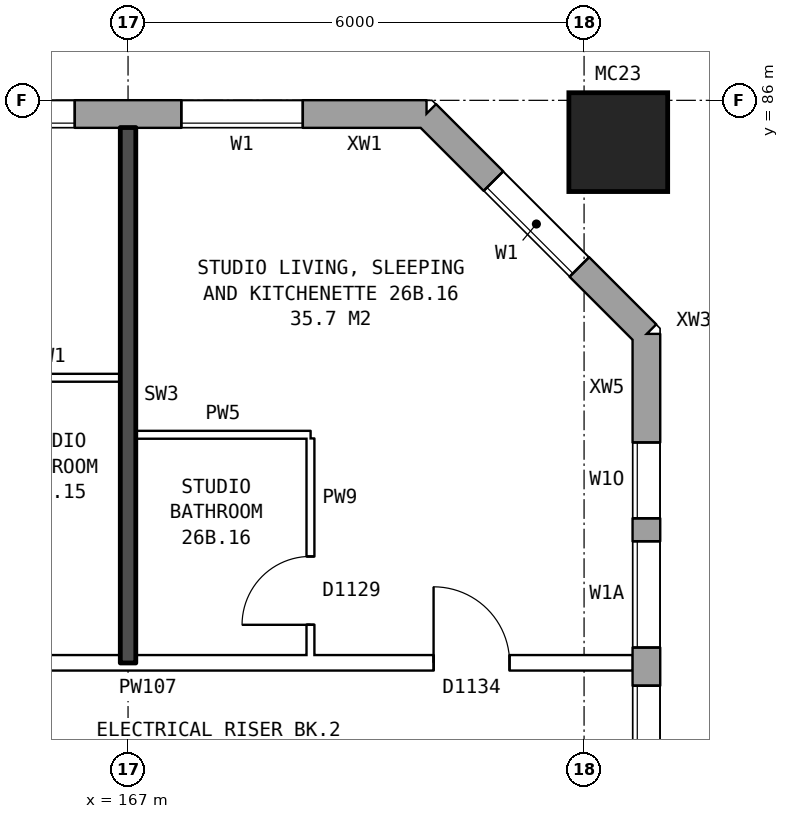
"""IFC4 building model, lengths in metres.
Left out: names, types, materials, properties, quantities, classifications, styles, units other than length and angle.
Written with IfcOpenShell. Run it as: python <this file> out.ifc"""

import sys

from ifc_helpers import new_model, si_unit, direction, frame, frame_2d, origin, origin_2d, place, context, subcontext, project, spatial, rectangle, hollow_rectangle, extrude, element, fill, save


model = new_model("IFC4")
c1 = context("Model", 3, precision=1e-05, world=origin(), true_north=direction((0.0, 1.0)))
c2 = subcontext(c1, "Body", "Model", "MODEL_VIEW")
j1 = project(units=[si_unit("LENGTHUNIT", "METRE"), si_unit("PLANEANGLEUNIT", "RADIAN")], contexts=[c1])
p1 = place(None, origin())
s1 = spatial("IfcSite", under=j1, at=p1, CompositionType="ELEMENT")
p2 = place(p1, origin())
s2 = spatial("IfcBuilding", under=s1, at=p2, CompositionType="ELEMENT")
p3 = place(p2, frame((0.0, 0.0, 96.4)))
s3 = spatial("IfcBuildingStorey", under=s2, at=p3, CompositionType="ELEMENT", Elevation=96.4)
p4 = place(p3, frame((173.45, 85.45, 0.0), z_axis=(0.0, 0.0, 1.0), x_axis=(1.0, 0.0, 0.0)))
e1 = element("IfcColumn", 1, at=p4, inside=s3, PredefinedType="COLUMN", context=c2, shape_type="SweptSolid", body=[
    extrude(hollow_rectangle(XDim=1.3, YDim=1.3, WallThickness=0.07, at=origin_2d()), origin(), (0.0, 0.0, 1.0), 3.1),
])
p5 = place(p3, frame((173.82, 57.075, 0.0), z_axis=(0.0, 0.0, 1.0), x_axis=(0.0, 1.0, 0.0)))
e2 = element("IfcWall", 2, at=p5, inside=s3, PredefinedType="STANDARD", context=c2, shape_type="SweptSolid", body=[
    extrude(rectangle(XDim=25.851, YDim=0.36, at=frame_2d((12.925, 0.0))), origin(), (0.0, 0.0, 1.0), 2.85),
])
p6 = place(p5, frame((0.9, 0.0, 0.8)))
e3 = element("IfcOpeningElement", 3, at=p6, cuts=e2, PredefinedType="OPENING", context=c2, shape_type="SweptSolid", body=[
    extrude(rectangle(XDim=0.8, YDim=0.9, at=frame_2d((0.4, 0.45))), frame((0.0, 0.19, 0.0), z_axis=(0.0, -1.0, 0.0), x_axis=(1.0, 0.0, 0.0)), (0.0, 0.0, 1.0), 0.38),
])
p7 = place(p5, frame((4.625, 0.0, 0.8)))
e4 = element("IfcOpeningElement", 4, at=p7, cuts=e2, PredefinedType="OPENING", context=c2, shape_type="SweptSolid", body=[
    extrude(rectangle(XDim=1.6, YDim=1.8, at=frame_2d((0.8, 0.9))), frame((0.0, 0.19, 0.0), z_axis=(0.0, -1.0, 0.0), x_axis=(1.0, 0.0, 0.0)), (0.0, 0.0, 1.0), 0.38),
])
p8 = place(p5, frame((7.625, 0.0, 0.8)))
e5 = element("IfcOpeningElement", 5, at=p8, cuts=e2, PredefinedType="OPENING", context=c2, shape_type="SweptSolid", body=[
    extrude(rectangle(XDim=1.6, YDim=1.8, at=frame_2d((0.8, 0.9))), frame((0.0, 0.19, 0.0), z_axis=(0.0, -1.0, 0.0), x_axis=(1.0, 0.0, 0.0)), (0.0, 0.0, 1.0), 0.38),
])
p9 = place(p5, frame((10.625, 0.0, 0.8)))
e6 = element("IfcOpeningElement", 6, at=p9, cuts=e2, PredefinedType="OPENING", context=c2, shape_type="SweptSolid", body=[
    extrude(rectangle(XDim=1.6, YDim=1.8, at=frame_2d((0.8, 0.9))), frame((0.0, 0.19, 0.0), z_axis=(0.0, -1.0, 0.0), x_axis=(1.0, 0.0, 0.0)), (0.0, 0.0, 1.0), 0.38),
])
p10 = place(p5, frame((13.625, 0.0, 0.8)))
e7 = element("IfcOpeningElement", 7, at=p10, cuts=e2, PredefinedType="OPENING", context=c2, shape_type="SweptSolid", body=[
    extrude(rectangle(XDim=1.6, YDim=1.8, at=frame_2d((0.8, 0.9))), frame((0.0, 0.19, 0.0), z_axis=(0.0, -1.0, 0.0), x_axis=(1.0, 0.0, 0.0)), (0.0, 0.0, 1.0), 0.38),
])
p11 = place(p5, frame((16.625, 0.0, 0.8)))
e8 = element("IfcOpeningElement", 8, at=p11, cuts=e2, PredefinedType="OPENING", context=c2, shape_type="SweptSolid", body=[
    extrude(rectangle(XDim=1.6, YDim=1.8, at=frame_2d((0.8, 0.9))), frame((0.0, 0.19, 0.0), z_axis=(0.0, -1.0, 0.0), x_axis=(1.0, 0.0, 0.0)), (0.0, 0.0, 1.0), 0.38),
])
p12 = place(p5, frame((19.625, 0.0, 0.8)))
e9 = element("IfcOpeningElement", 9, at=p12, cuts=e2, PredefinedType="OPENING", context=c2, shape_type="SweptSolid", body=[
    extrude(rectangle(XDim=1.6, YDim=1.8, at=frame_2d((0.8, 0.9))), frame((0.0, 0.19, 0.0), z_axis=(0.0, -1.0, 0.0), x_axis=(1.0, 0.0, 0.0)), (0.0, 0.0, 1.0), 0.38),
])
p13 = place(p5, frame((21.725, 0.0, 0.8)))
e10 = element("IfcOpeningElement", 10, at=p13, cuts=e2, PredefinedType="OPENING", context=c2, shape_type="SweptSolid", body=[
    extrude(rectangle(XDim=1.4, YDim=1.8, at=frame_2d((0.7, 0.9))), frame((0.0, 0.19, 0.0), z_axis=(0.0, -1.0, 0.0), x_axis=(1.0, 0.0, 0.0)), (0.0, 0.0, 1.0), 0.38),
])
p14 = place(p5, frame((2.0, 0.0, 0.8)))
e11 = element("IfcOpeningElement", 11, at=p14, cuts=e2, PredefinedType="OPENING", context=c2, shape_type="SweptSolid", body=[
    extrude(rectangle(XDim=0.8, YDim=1.5, at=frame_2d((0.4, 0.75))), frame((0.0, 0.19, 0.0), z_axis=(0.0, -1.0, 0.0), x_axis=(1.0, 0.0, 0.0)), (0.0, 0.0, 1.0), 0.38),
])
p15 = place(p5, frame((3.1, 0.0, 0.8)))
e12 = element("IfcOpeningElement", 12, at=p15, cuts=e2, PredefinedType="OPENING", context=c2, shape_type="SweptSolid", body=[
    extrude(rectangle(XDim=1.0, YDim=1.8, at=frame_2d((0.5, 0.9))), frame((0.0, 0.19, 0.0), z_axis=(0.0, -1.0, 0.0), x_axis=(1.0, 0.0, 0.0)), (0.0, 0.0, 1.0), 0.38),
])
p16 = place(p5, frame((23.425, 0.0, 0.8)))
e13 = element("IfcOpeningElement", 13, at=p16, cuts=e2, PredefinedType="OPENING", context=c2, shape_type="SweptSolid", body=[
    extrude(rectangle(XDim=1.0, YDim=1.2, at=frame_2d((0.5, 0.6))), frame((0.0, 0.19, 0.0), z_axis=(0.0, -1.0, 0.0), x_axis=(1.0, 0.0, 0.0)), (0.0, 0.0, 1.0), 0.38),
])
p17 = place(p3, frame((173.82, 82.925, 0.0), z_axis=(0.0, 0.0, 1.0), x_axis=(-0.707106781187, 0.707106781187, 0.0)))
e14 = element("IfcWall", 14, at=p17, inside=s3, PredefinedType="STANDARD", context=c2, shape_type="SweptSolid", body=[
    extrude(rectangle(XDim=4.094, YDim=0.36, at=frame_2d((2.047, 0.0))), origin(), (0.0, 0.0, 1.0), 2.85),
])
p18 = place(p17, frame((1.247, 0.0, 0.8)))
e15 = element("IfcOpeningElement", 15, at=p18, cuts=e14, PredefinedType="OPENING", context=c2, shape_type="SweptSolid", body=[
    extrude(rectangle(XDim=1.6, YDim=1.8, at=frame_2d((0.8, 0.9))), frame((0.0, 0.19, 0.0), z_axis=(0.0, -1.0, 0.0), x_axis=(1.0, 0.0, 0.0)), (0.0, 0.0, 1.0), 0.38),
])
p19 = place(p3, frame((170.925, 85.82, 0.0), z_axis=(0.0, 0.0, 1.0), x_axis=(-1.0, 0.0, 0.0)))
e16 = element("IfcWall", 16, at=p19, inside=s3, PredefinedType="STANDARD", context=c2, shape_type="SweptSolid", body=[
    extrude(rectangle(XDim=36.851, YDim=0.36, at=frame_2d((18.425, 0.0))), origin(), (0.0, 0.0, 1.0), 2.85),
])
p20 = place(p19, frame((1.625, 0.0, 0.8)))
e17 = element("IfcOpeningElement", 17, at=p20, cuts=e16, PredefinedType="OPENING", context=c2, shape_type="SweptSolid", body=[
    extrude(rectangle(XDim=1.6, YDim=1.8, at=frame_2d((0.8, 0.9))), frame((0.0, 0.19, 0.0), z_axis=(0.0, -1.0, 0.0), x_axis=(1.0, 0.0, 0.0)), (0.0, 0.0, 1.0), 0.38),
])
p21 = place(p19, frame((4.625, 0.0, 0.8)))
e18 = element("IfcOpeningElement", 18, at=p21, cuts=e16, PredefinedType="OPENING", context=c2, shape_type="SweptSolid", body=[
    extrude(rectangle(XDim=1.6, YDim=1.8, at=frame_2d((0.8, 0.9))), frame((0.0, 0.19, 0.0), z_axis=(0.0, -1.0, 0.0), x_axis=(1.0, 0.0, 0.0)), (0.0, 0.0, 1.0), 0.38),
])
p22 = place(p19, frame((7.625, 0.0, 0.8)))
e19 = element("IfcOpeningElement", 19, at=p22, cuts=e16, PredefinedType="OPENING", context=c2, shape_type="SweptSolid", body=[
    extrude(rectangle(XDim=1.6, YDim=1.8, at=frame_2d((0.8, 0.9))), frame((0.0, 0.19, 0.0), z_axis=(0.0, -1.0, 0.0), x_axis=(1.0, 0.0, 0.0)), (0.0, 0.0, 1.0), 0.38),
])
p23 = place(p19, frame((10.625, 0.0, 0.8)))
e20 = element("IfcOpeningElement", 20, at=p23, cuts=e16, PredefinedType="OPENING", context=c2, shape_type="SweptSolid", body=[
    extrude(rectangle(XDim=1.6, YDim=1.8, at=frame_2d((0.8, 0.9))), frame((0.0, 0.19, 0.0), z_axis=(0.0, -1.0, 0.0), x_axis=(1.0, 0.0, 0.0)), (0.0, 0.0, 1.0), 0.38),
])
p24 = place(p19, frame((13.625, 0.0, 0.8)))
e21 = element("IfcOpeningElement", 21, at=p24, cuts=e16, PredefinedType="OPENING", context=c2, shape_type="SweptSolid", body=[
    extrude(rectangle(XDim=1.6, YDim=1.8, at=frame_2d((0.8, 0.9))), frame((0.0, 0.19, 0.0), z_axis=(0.0, -1.0, 0.0), x_axis=(1.0, 0.0, 0.0)), (0.0, 0.0, 1.0), 0.38),
])
p25 = place(p19, frame((16.625, 0.0, 0.8)))
e22 = element("IfcOpeningElement", 22, at=p25, cuts=e16, PredefinedType="OPENING", context=c2, shape_type="SweptSolid", body=[
    extrude(rectangle(XDim=1.6, YDim=1.8, at=frame_2d((0.8, 0.9))), frame((0.0, 0.19, 0.0), z_axis=(0.0, -1.0, 0.0), x_axis=(1.0, 0.0, 0.0)), (0.0, 0.0, 1.0), 0.38),
])
p26 = place(p19, frame((19.625, 0.0, 0.8)))
e23 = element("IfcOpeningElement", 23, at=p26, cuts=e16, PredefinedType="OPENING", context=c2, shape_type="SweptSolid", body=[
    extrude(rectangle(XDim=1.6, YDim=1.8, at=frame_2d((0.8, 0.9))), frame((0.0, 0.19, 0.0), z_axis=(0.0, -1.0, 0.0), x_axis=(1.0, 0.0, 0.0)), (0.0, 0.0, 1.0), 0.38),
])
p27 = place(p19, frame((22.625, 0.0, 0.8)))
e24 = element("IfcOpeningElement", 24, at=p27, cuts=e16, PredefinedType="OPENING", context=c2, shape_type="SweptSolid", body=[
    extrude(rectangle(XDim=1.6, YDim=1.8, at=frame_2d((0.8, 0.9))), frame((0.0, 0.19, 0.0), z_axis=(0.0, -1.0, 0.0), x_axis=(1.0, 0.0, 0.0)), (0.0, 0.0, 1.0), 0.38),
])
p28 = place(p19, frame((25.625, 0.0, 0.8)))
e25 = element("IfcOpeningElement", 25, at=p28, cuts=e16, PredefinedType="OPENING", context=c2, shape_type="SweptSolid", body=[
    extrude(rectangle(XDim=1.6, YDim=1.8, at=frame_2d((0.8, 0.9))), frame((0.0, 0.19, 0.0), z_axis=(0.0, -1.0, 0.0), x_axis=(1.0, 0.0, 0.0)), (0.0, 0.0, 1.0), 0.38),
])
p29 = place(p19, frame((28.625, 0.0, 0.8)))
e26 = element("IfcOpeningElement", 26, at=p29, cuts=e16, PredefinedType="OPENING", context=c2, shape_type="SweptSolid", body=[
    extrude(rectangle(XDim=1.6, YDim=1.8, at=frame_2d((0.8, 0.9))), frame((0.0, 0.19, 0.0), z_axis=(0.0, -1.0, 0.0), x_axis=(1.0, 0.0, 0.0)), (0.0, 0.0, 1.0), 0.38),
])
p30 = place(p19, frame((31.625, 0.0, 0.8)))
e27 = element("IfcOpeningElement", 27, at=p30, cuts=e16, PredefinedType="OPENING", context=c2, shape_type="SweptSolid", body=[
    extrude(rectangle(XDim=1.6, YDim=1.8, at=frame_2d((0.8, 0.9))), frame((0.0, 0.19, 0.0), z_axis=(0.0, -1.0, 0.0), x_axis=(1.0, 0.0, 0.0)), (0.0, 0.0, 1.0), 0.38),
])
p31 = place(p19, frame((34.125, 0.0, 0.8)))
e28 = element("IfcOpeningElement", 28, at=p31, cuts=e16, PredefinedType="OPENING", context=c2, shape_type="SweptSolid", body=[
    extrude(rectangle(XDim=1.4, YDim=1.8, at=frame_2d((0.7, 0.9))), frame((0.0, 0.19, 0.0), z_axis=(0.0, -1.0, 0.0), x_axis=(1.0, 0.0, 0.0)), (0.0, 0.0, 1.0), 0.38),
])
p32 = place(p19, frame((35.825, 0.0, 0.8)))
e29 = element("IfcOpeningElement", 29, at=p32, cuts=e16, PredefinedType="OPENING", context=c2, shape_type="SweptSolid", body=[
    extrude(rectangle(XDim=0.6, YDim=1.2, at=frame_2d((0.3, 0.6))), frame((0.0, 0.19, 0.0), z_axis=(0.0, -1.0, 0.0), x_axis=(1.0, 0.0, 0.0)), (0.0, 0.0, 1.0), 0.38),
])
p33 = place(p3, frame((155.1, 78.6, 0.0), z_axis=(0.0, 0.0, 1.0), x_axis=(1.0, 0.0, 0.0)))
e30 = element("IfcWall", 30, at=p33, inside=s3, PredefinedType="PARTITIONING", context=c2, shape_type="SweptSolid", body=[
    extrude(rectangle(XDim=18.54, YDim=0.2, at=frame_2d((9.27, 0.0))), origin(), (0.0, 0.0, 1.0), 2.85),
])
p34 = place(p33, frame((3.6, 0.0, 0.0)))
e31 = element("IfcOpeningElement", 31, at=p34, cuts=e30, PredefinedType="OPENING", context=c2, shape_type="SweptSolid", body=[
    extrude(rectangle(XDim=1.0, YDim=2.1, at=frame_2d((0.5, 1.05))), frame((0.0, 0.11, 0.0), z_axis=(0.0, -1.0, 0.0), x_axis=(1.0, 0.0, 0.0)), (0.0, 0.0, 1.0), 0.22),
])
p35 = place(p33, frame((7.4, 0.0, 0.0)))
e32 = element("IfcOpeningElement", 32, at=p35, cuts=e30, PredefinedType="OPENING", context=c2, shape_type="SweptSolid", body=[
    extrude(rectangle(XDim=1.0, YDim=2.1, at=frame_2d((0.5, 1.05))), frame((0.0, 0.11, 0.0), z_axis=(0.0, -1.0, 0.0), x_axis=(1.0, 0.0, 0.0)), (0.0, 0.0, 1.0), 0.22),
])
p36 = place(p33, frame((15.92, 0.0, 0.0)))
e33 = element("IfcOpeningElement", 33, at=p36, cuts=e30, PredefinedType="OPENING", context=c2, shape_type="SweptSolid", body=[
    extrude(rectangle(XDim=1.0, YDim=2.1, at=frame_2d((0.5, 1.05))), frame((0.0, 0.11, 0.0), z_axis=(0.0, -1.0, 0.0), x_axis=(1.0, 0.0, 0.0)), (0.0, 0.0, 1.0), 0.22),
])
p37 = place(p3, frame((167.1, 81.6, 0.0), z_axis=(0.0, 0.0, 1.0), x_axis=(1.0, 0.0, 0.0)))
e34 = element("IfcWall", 34, at=p37, inside=s3, PredefinedType="PARTITIONING", context=c2, shape_type="SweptSolid", body=[
    extrude(rectangle(XDim=2.3, YDim=0.1, at=frame_2d((1.15, 0.0))), origin(), (0.0, 0.0, 1.0), 2.85),
])
p38 = place(p3, frame((165.0, 82.35, 0.0), z_axis=(0.0, 0.0, 1.0), x_axis=(1.0, 0.0, 0.0)))
e35 = element("IfcWall", 35, at=p38, inside=s3, PredefinedType="PARTITIONING", context=c2, shape_type="SweptSolid", body=[
    extrude(rectangle(XDim=1.9, YDim=0.1, at=frame_2d((0.95, 0.0))), origin(), (0.0, 0.0, 1.0), 2.85),
])
p39 = place(p3, frame((167.0, 78.6, 0.0), z_axis=(0.0, 0.0, 1.0), x_axis=(0.0, 1.0, 0.0)))
e36 = element("IfcWall", 36, at=p39, inside=s3, PredefinedType="SOLIDWALL", context=c2, shape_type="SweptSolid", body=[
    extrude(rectangle(XDim=7.04, YDim=0.2, at=frame_2d((3.52, 0.0))), origin(), (0.0, 0.0, 1.0), 2.85),
])
p40 = place(p3, frame((169.4, 78.7, 0.0), z_axis=(0.0, 0.0, 1.0), x_axis=(0.0, 1.0, 0.0)))
e37 = element("IfcWall", 37, at=p40, inside=s3, PredefinedType="PARTITIONING", context=c2, shape_type="SweptSolid", body=[
    extrude(rectangle(XDim=2.85, YDim=0.1, at=frame_2d((1.425, 0.0))), origin(), (0.0, 0.0, 1.0), 2.85),
])
p41 = place(p40, frame((0.4, 0.0, 0.0)))
e38 = element("IfcOpeningElement", 38, at=p41, cuts=e37, PredefinedType="OPENING", context=c2, shape_type="SweptSolid", body=[
    extrude(rectangle(XDim=0.9, YDim=2.1, at=frame_2d((0.45, 1.05))), frame((0.0, 0.06, 0.0), z_axis=(0.0, -1.0, 0.0), x_axis=(1.0, 0.0, 0.0)), (0.0, 0.0, 1.0), 0.12),
])
p42 = place(p12, origin())
e39 = element("IfcWindow", 39, at=p42, inside=s3, PartitioningType="SINGLE_PANEL", PredefinedType="WINDOW", context=c2, shape_type="SweptSolid", body=[
    extrude(rectangle(XDim=1.6, YDim=1.8, at=frame_2d((0.8, 0.9))), frame((0.0, 0.15, 0.0), z_axis=(0.0, -1.0, 0.0), x_axis=(1.0, 0.0, 0.0)), (0.0, 0.0, 1.0), 0.06),
])
fill(e9, e39)
p43 = place(p13, origin())
e40 = element("IfcWindow", 40, at=p43, inside=s3, PartitioningType="SINGLE_PANEL", PredefinedType="WINDOW", context=c2, shape_type="SweptSolid", body=[
    extrude(rectangle(XDim=1.4, YDim=1.8, at=frame_2d((0.7, 0.9))), frame((0.0, 0.15, 0.0), z_axis=(0.0, -1.0, 0.0), x_axis=(1.0, 0.0, 0.0)), (0.0, 0.0, 1.0), 0.06),
])
fill(e10, e40)
p44 = place(p18, origin())
e41 = element("IfcWindow", 41, at=p44, inside=s3, PartitioningType="SINGLE_PANEL", PredefinedType="WINDOW", context=c2, shape_type="SweptSolid", body=[
    extrude(rectangle(XDim=1.6, YDim=1.8, at=frame_2d((0.8, 0.9))), frame((0.0, 0.15, 0.0), z_axis=(0.0, -1.0, 0.0), x_axis=(1.0, 0.0, 0.0)), (0.0, 0.0, 1.0), 0.06),
])
fill(e15, e41)
p45 = place(p20, origin())
e42 = element("IfcWindow", 42, at=p45, inside=s3, PartitioningType="SINGLE_PANEL", PredefinedType="WINDOW", context=c2, shape_type="SweptSolid", body=[
    extrude(rectangle(XDim=1.6, YDim=1.8, at=frame_2d((0.8, 0.9))), frame((0.0, 0.15, 0.0), z_axis=(0.0, -1.0, 0.0), x_axis=(1.0, 0.0, 0.0)), (0.0, 0.0, 1.0), 0.06),
])
fill(e17, e42)
p46 = place(p21, origin())
e43 = element("IfcWindow", 43, at=p46, inside=s3, PartitioningType="SINGLE_PANEL", PredefinedType="WINDOW", context=c2, shape_type="SweptSolid", body=[
    extrude(rectangle(XDim=1.6, YDim=1.8, at=frame_2d((0.8, 0.9))), frame((0.0, 0.15, 0.0), z_axis=(0.0, -1.0, 0.0), x_axis=(1.0, 0.0, 0.0)), (0.0, 0.0, 1.0), 0.06),
])
fill(e18, e43)
p47 = place(p36, origin())
e44 = element("IfcDoor", 44, at=p47, inside=s3, OperationType="SINGLE_SWING_LEFT", PredefinedType="DOOR", context=c2, shape_type="SweptSolid", body=[
    extrude(rectangle(XDim=1.0, YDim=2.1, at=frame_2d((0.5, 1.05))), frame((0.0, 0.025, 0.0), z_axis=(0.0, -1.0, 0.0), x_axis=(1.0, 0.0, 0.0)), (0.0, 0.0, 1.0), 0.05),
])
fill(e33, e44)
p48 = place(p41, origin())
e45 = element("IfcDoor", 45, at=p48, inside=s3, OperationType="SINGLE_SWING_LEFT", PredefinedType="DOOR", context=c2, shape_type="SweptSolid", body=[
    extrude(rectangle(XDim=0.9, YDim=2.1, at=frame_2d((0.45, 1.05))), frame((0.0, 0.025, 0.0), z_axis=(0.0, -1.0, 0.0), x_axis=(1.0, 0.0, 0.0)), (0.0, 0.0, 1.0), 0.05),
])
fill(e38, e45)
p49 = place(p16, origin())
e46 = element("IfcWindow", 46, at=p49, inside=s3, PartitioningType="SINGLE_PANEL", PredefinedType="WINDOW", context=c2, shape_type="SweptSolid", body=[
    extrude(rectangle(XDim=1.0, YDim=1.2, at=frame_2d((0.5, 0.6))), frame((0.0, 0.15, 0.0), z_axis=(0.0, -1.0, 0.0), x_axis=(1.0, 0.0, 0.0)), (0.0, 0.0, 1.0), 0.06),
])
fill(e13, e46)
save(model, sys.argv[1])
